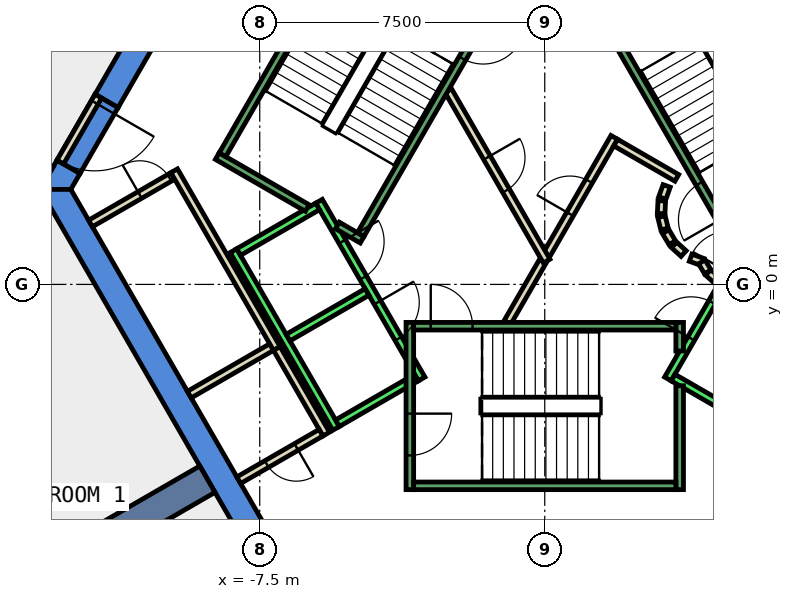
"""IFC4 building model, lengths in metres.
Left out: names, types, materials, properties, quantities, classifications, styles, units other than length and angle.
Written with IfcOpenShell. Run it as: python <this file> out.ifc"""

import sys

from ifc_helpers import new_model, si_unit, direction, frame, frame_2d, origin, place, context, subcontext, project, spatial, polyline, rectangle, outline, extrude, element, fill, save


model = new_model("IFC4")
c1 = context("Model", 3, precision=1e-05, world=origin(), true_north=direction((0.0, 1.0)))
c2 = subcontext(c1, "Body", "Model", "MODEL_VIEW")
j1 = project(units=[si_unit("LENGTHUNIT", "METRE"), si_unit("PLANEANGLEUNIT", "RADIAN")], contexts=[c1])
p1 = place(None, origin())
s1 = spatial("IfcSite", under=j1, at=p1, CompositionType="ELEMENT")
p2 = place(p1, origin())
s2 = spatial("IfcBuilding", under=s1, at=p2, CompositionType="ELEMENT")
p3 = place(p2, frame((0.0, 0.0, 219.2)))
s3 = spatial("IfcBuildingStorey", under=s2, at=p3, CompositionType="ELEMENT", Elevation=219.2)
p4 = place(p3, frame((0.0, 0.0, -0.4)))
e1 = element("IfcWall", 1, at=p4, inside=s3, PredefinedType="SHEAR", context=c2, shape_type="SweptSolid", body=[
    extrude(outline(polyline([(-11.834, 5.002), (-11.228, 4.652), (-6.235, 13.3), (-6.64, 14.0), (-11.834, 5.002)])), origin(), (0.0, 0.0, 1.0), 4.2),
])
p5 = place(p3, frame((0.0, 0.0, -0.4)))
e2 = element("IfcWall", 2, at=p5, inside=s3, PredefinedType="SHEAR", context=c2, shape_type="SweptSolid", body=[
    extrude(outline(polyline([(-12.228, 2.92), (-12.834, 3.27), (-13.279, 2.5), (-12.471, 2.5), (-12.228, 2.92)])), origin(), (0.0, 0.0, 1.0), 4.2),
])
p6 = place(p3, frame((0.0, 0.0, 3.6)))
e3 = element("IfcWall", 3, at=p6, inside=s3, PredefinedType="SHEAR", context=c2, shape_type="SweptSolid", body=[
    extrude(outline(polyline([(-12.834, 3.27), (-12.228, 2.92), (-11.228, 4.652), (-11.834, 5.002), (-12.834, 3.27)])), origin(), (0.0, 0.0, 1.0), 0.2),
])
p7 = place(p3, frame((0.0, 0.0, -0.4)))
e4 = element("IfcWall", 4, at=p7, inside=s3, PredefinedType="SHEAR", context=c2, shape_type="SweptSolid", body=[
    extrude(outline(polyline([(-13.279, 2.5), (-6.64, -9.0), (-6.235, -8.3), (-12.471, 2.5), (-13.279, 2.5)])), origin(), (0.0, 0.0, 1.0), 4.2),
])
p8 = place(p3, frame((-8.877, -5.125, -0.4), z_axis=(0.0, 0.0, 1.0), x_axis=(-0.866017533419, -0.500013631625, 0.0)))
e5 = element("IfcWall", 5, at=p8, inside=s3, PredefinedType="SHEAR", context=c2, shape_type="SweptSolid", body=[
    extrude(rectangle(XDim=9.0, YDim=0.8, at=frame_2d((4.5, 0.0))), origin(), (0.0, 0.0, 1.0), 4.2),
])
p9 = place(p3, frame((-12.984, 3.01, 0.0), z_axis=(0.0, 0.0, 1.0), x_axis=(-0.866046247233, 0.49996389635, 0.0)))
e6 = element("IfcWall", 6, at=p9, inside=s3, PredefinedType="PARTITIONING", context=c2, shape_type="SweptSolid", body=[
    extrude(rectangle(XDim=0.35, YDim=0.2, at=frame_2d((0.175, 0.0))), origin(), (0.0, 0.0, 1.0), 2.4),
])
p10 = place(p3, frame((-7.188, -1.65, 0.0), z_axis=(0.0, 0.0, 1.0), x_axis=(-0.866022959057, -0.500004234368, 0.0)))
e7 = element("IfcWall", 7, at=p10, inside=s3, PredefinedType="PARTITIONING", context=c2, shape_type="SweptSolid", body=[
    extrude(rectangle(XDim=2.5, YDim=0.2, at=frame_2d((1.25, 0.0))), origin(), (0.0, 0.0, 1.0), 3.8),
])
p11 = place(p3, frame((-11.953, 1.603, 0.0), z_axis=(0.0, 0.0, 1.0), x_axis=(0.865998541277, 0.500046524342, 0.0)))
e8 = element("IfcWall", 8, at=p11, inside=s3, PredefinedType="PARTITIONING", context=c2, shape_type="SweptSolid", body=[
    extrude(rectangle(XDim=2.5, YDim=0.2, at=frame_2d((1.25, 0.0))), origin(), (0.0, 0.0, 1.0), 3.8),
])
p12 = place(p11, frame((1.5, 0.0, 0.0)))
e9 = element("IfcOpeningElement", 9, at=p12, cuts=e8, PredefinedType="OPENING", context=c2, shape_type="SweptSolid", body=[
    extrude(rectangle(XDim=0.9, YDim=2.1, at=frame_2d((0.45, 1.05))), frame((0.0, 0.11, 0.0), z_axis=(0.0, -1.0, 0.0), x_axis=(1.0, 0.0, 0.0)), (0.0, 0.0, 1.0), 0.22),
])
p13 = place(p3, frame((-9.751, 2.99, 0.0), z_axis=(0.0, 0.0, 1.0), x_axis=(0.499955951776, -0.866050833545, 0.0)))
e10 = element("IfcWall", 10, at=p13, inside=s3, PredefinedType="PARTITIONING", context=c2, shape_type="SweptSolid", body=[
    extrude(rectangle(XDim=5.4, YDim=0.2, at=frame_2d((2.7, 0.0))), origin(), (0.0, 0.0, 1.0), 3.8),
])
p14 = place(p3, frame((-7.051, -1.687, 0.0), z_axis=(0.0, 0.0, 1.0), x_axis=(0.500128937424, -0.865950948929, 0.0)))
e11 = element("IfcWall", 11, at=p14, inside=s3, PredefinedType="PARTITIONING", context=c2, shape_type="SweptSolid", body=[
    extrude(rectangle(XDim=2.599, YDim=0.2, at=frame_2d((1.3, 0.0))), origin(), (0.0, 0.0, 1.0), 3.8),
])
p15 = place(p3, frame((-5.888, -3.902, 0.0), z_axis=(0.0, 0.0, 1.0), x_axis=(-0.866022959057, -0.500004234368, 0.0)))
e12 = element("IfcWall", 12, at=p15, inside=s3, PredefinedType="PARTITIONING", context=c2, shape_type="SweptSolid", body=[
    extrude(rectangle(XDim=2.5, YDim=0.2, at=frame_2d((1.25, 0.0))), origin(), (0.0, 0.0, 1.0), 3.8),
])
p16 = place(p15, frame((0.75, 0.0, 0.0)))
e13 = element("IfcOpeningElement", 13, at=p16, cuts=e12, PredefinedType="OPENING", context=c2, shape_type="SweptSolid", body=[
    extrude(rectangle(XDim=0.9, YDim=2.1, at=frame_2d((0.45, 1.05))), frame((0.0, 0.11, 0.0), z_axis=(0.0, -1.0, 0.0), x_axis=(1.0, 0.0, 0.0)), (0.0, 0.0, 1.0), 0.22),
])
p17 = place(p3, frame((-0.982, -1.0, 0.0), z_axis=(0.0, 0.0, 1.0), x_axis=(0.50024047865, 0.865886518847, 0.0)))
e14 = element("IfcWall", 14, at=p17, inside=s3, PredefinedType="PARTITIONING", context=c2, shape_type="SweptSolid", body=[
    extrude(rectangle(XDim=1.863, YDim=0.2, at=frame_2d((0.931, 0.0))), origin(), (0.0, 0.0, 1.0), 3.8),
])
p18 = place(p3, frame((0.05, 0.787, 0.0), z_axis=(0.0, 0.0, 1.0), x_axis=(0.499954076797, 0.866051915934, 0.0)))
e15 = element("IfcWall", 15, at=p18, inside=s3, PredefinedType="PARTITIONING", context=c2, shape_type="SweptSolid", body=[
    extrude(rectangle(XDim=3.558, YDim=0.2, at=frame_2d((1.779, 0.0))), origin(), (0.0, 0.0, 1.0), 3.8),
])
p19 = place(p18, frame((1.229, 0.0, 0.0)))
e16 = element("IfcOpeningElement", 16, at=p19, cuts=e15, PredefinedType="OPENING", context=c2, shape_type="SweptSolid", body=[
    extrude(rectangle(XDim=1.0, YDim=2.1, at=frame_2d((0.5, 1.05))), frame((0.0, 0.11, 0.0), z_axis=(0.0, -1.0, 0.0), x_axis=(1.0, 0.0, 0.0)), (0.0, 0.0, 1.0), 0.22),
])
p20 = place(p3, frame((1.866, 3.732, 0.0), z_axis=(0.0, 0.0, 1.0), x_axis=(0.866043361281, -0.499968895414, 0.0)))
e17 = element("IfcWall", 17, at=p20, inside=s3, PredefinedType="PARTITIONING", context=c2, shape_type="SweptSolid", body=[
    extrude(rectangle(XDim=1.858, YDim=0.2, at=frame_2d((0.929, 0.0))), origin(), (0.0, 0.0, 1.0), 3.8),
])
p21 = place(p3, frame((3.208, 2.592, 0.0), z_axis=(0.0, 0.0, 1.0), x_axis=(-0.337388820924, -0.941365382578, 0.0)))
e18 = element("IfcWall", 18, at=p21, inside=s3, PredefinedType="PARTITIONING", context=c2, shape_type="SweptSolid", body=[
    extrude(rectangle(XDim=0.338, YDim=0.2, at=frame_2d((0.169, 0.0))), origin(), (0.0, 0.0, 1.0), 3.8),
])
p22 = place(p3, frame((3.079, 2.199, 0.0), z_axis=(0.0, 0.0, 1.0), x_axis=(-0.047771483479, -0.998858290933, 0.0)))
e19 = element("IfcWall", 19, at=p22, inside=s3, PredefinedType="PARTITIONING", context=c2, shape_type="SweptSolid", body=[
    extrude(rectangle(XDim=0.337, YDim=0.2, at=frame_2d((0.169, 0.0))), origin(), (0.0, 0.0, 1.0), 3.8),
])
p23 = place(p3, frame((3.07, 1.786, 0.0), z_axis=(0.0, 0.0, 1.0), x_axis=(0.242705583207, -0.970099994784, 0.0)))
e20 = element("IfcWall", 20, at=p23, inside=s3, PredefinedType="PARTITIONING", context=c2, shape_type="SweptSolid", body=[
    extrude(rectangle(XDim=0.338, YDim=0.2, at=frame_2d((0.169, 0.0))), origin(), (0.0, 0.0, 1.0), 3.8),
])
for number, where, z_axis, x_axis in (
    (21, (3.182, 1.388, 0.0), (0.0, 0.0, 1.0), (0.512, -0.859, 0.0)),
    (22, (3.404, 1.039, 0.0), (0.0, 0.0, 1.0), (0.74, -0.672, 0.0)),
):
    element("IfcWall", number, at=place(p3, frame(where, z_axis=z_axis, x_axis=x_axis)), inside=s3, PredefinedType="PARTITIONING", context=c2, shape_type="SweptSolid", body=[
        extrude(rectangle(XDim=0.338, YDim=0.2, at=frame_2d((0.169, 0.0))), origin(), (0.0, 0.0, 1.0), 3.8),
    ])
p24 = place(p3, frame((3.838, 0.702, 0.0), z_axis=(0.0, 0.0, 1.0), x_axis=(0.941035081519, -0.338308993895, 0.0)))
e23 = element("IfcWall", 23, at=p24, inside=s3, PredefinedType="PARTITIONING", context=c2, shape_type="SweptSolid", body=[
    extrude(rectangle(XDim=0.337, YDim=0.2, at=frame_2d((0.168, 0.0))), origin(), (0.0, 0.0, 1.0), 3.8),
])
p25 = place(p3, frame((4.132, 0.593, 0.0), z_axis=(0.0, 0.0, 1.0), x_axis=(0.513561617048, -0.858052717201, 0.0)))
e24 = element("IfcWall", 24, at=p25, inside=s3, PredefinedType="PARTITIONING", context=c2, shape_type="SweptSolid", body=[
    extrude(rectangle(XDim=0.308, YDim=0.2, at=frame_2d((0.154, 0.0))), origin(), (0.0, 0.0, 1.0), 3.8),
])
p26 = place(p3, frame((4.301, 0.315, 0.0), z_axis=(0.0, 0.0, 1.0), x_axis=(0.741798017506, -0.670623367639, 0.0)))
e25 = element("IfcWall", 25, at=p26, inside=s3, PredefinedType="PARTITIONING", context=c2, shape_type="SweptSolid", body=[
    extrude(rectangle(XDim=0.309, YDim=0.2, at=frame_2d((0.154, 0.0))), origin(), (0.0, 0.0, 1.0), 3.8),
])
p27 = place(p3, frame((-2.54, 5.1, 0.0), z_axis=(0.0, 0.0, 1.0), x_axis=(0.499925051871, -0.866068670783, 0.0)))
e26 = element("IfcWall", 26, at=p27, inside=s3, PredefinedType="PARTITIONING", context=c2, shape_type="SweptSolid", body=[
    extrude(rectangle(XDim=5.181, YDim=0.2, at=frame_2d((2.59, 0.0))), origin(), (0.0, 0.0, 1.0), 3.8),
])
p28 = place(p27, frame((2.04, 0.0, 0.0)))
e27 = element("IfcOpeningElement", 27, at=p28, cuts=e26, PredefinedType="OPENING", context=c2, shape_type="SweptSolid", body=[
    extrude(rectangle(XDim=1.0, YDim=2.1, at=frame_2d((0.5, 1.05))), frame((0.0, 0.11, 0.0), z_axis=(0.0, -1.0, 0.0), x_axis=(1.0, 0.0, 0.0)), (0.0, 0.0, 1.0), 0.22),
])
p29 = place(p3, frame((-11.747, 4.952, 0.0), z_axis=(0.0, 0.0, 1.0), x_axis=(-0.50002537861, -0.866010750942, 0.0)))
e28 = element("IfcWall", 28, at=p29, inside=s3, PredefinedType="PARTITIONING", context=c2, shape_type="SweptSolid", body=[
    extrude(rectangle(XDim=2.0, YDim=0.2, at=frame_2d((1.0, 0.0))), origin(), (0.0, 0.0, 1.0), 2.4),
])
p30 = place(p29, frame((0.19, 0.0, 0.0)))
e29 = element("IfcOpeningElement", 29, at=p30, cuts=e28, PredefinedType="OPENING", context=c2, shape_type="SweptSolid", body=[
    extrude(rectangle(XDim=1.8, YDim=2.1, at=frame_2d((0.9, 1.05))), frame((0.0, 0.11, 0.0), z_axis=(0.0, -1.0, 0.0), x_axis=(1.0, 0.0, 0.0)), (0.0, 0.0, 1.0), 0.22),
])
p31 = place(p3, frame((-5.94, 2.188, 0.0), z_axis=(0.0, 0.0, 1.0), x_axis=(0.500034260056, -0.866005622828, 0.0)))
e30 = element("IfcWall", 30, at=p31, inside=s3, PredefinedType="STANDARD", context=c2, shape_type="SweptSolid", body=[
    extrude(rectangle(XDim=5.399, YDim=0.2, at=frame_2d((2.7, 0.0))), origin(), (0.0, 0.0, 1.0), 3.8),
])
p32 = place(p31, frame((3.075, 0.0, 0.0)))
e31 = element("IfcOpeningElement", 31, at=p32, cuts=e30, PredefinedType="OPENING", context=c2, shape_type="SweptSolid", body=[
    extrude(rectangle(XDim=1.1, YDim=2.1, at=frame_2d((0.55, 1.05))), frame((0.0, 0.11, 0.0), z_axis=(0.0, -1.0, 0.0), x_axis=(1.0, 0.0, 0.0)), (0.0, 0.0, 1.0), 0.22),
])
p33 = place(p31, frame((1.225, 0.0, 0.0)))
e32 = element("IfcOpeningElement", 32, at=p33, cuts=e30, PredefinedType="OPENING", context=c2, shape_type="SweptSolid", body=[
    extrude(rectangle(XDim=1.1, YDim=2.1, at=frame_2d((0.55, 1.05))), frame((0.0, 0.11, 0.0), z_axis=(0.0, -1.0, 0.0), x_axis=(1.0, 0.0, 0.0)), (0.0, 0.0, 1.0), 0.22),
])
p34 = place(p3, frame((-8.192, 0.888, 0.0), z_axis=(0.0, 0.0, 1.0), x_axis=(0.500034260056, -0.866005622828, 0.0)))
e33 = element("IfcWall", 33, at=p34, inside=s3, PredefinedType="STANDARD", context=c2, shape_type="SweptSolid", body=[
    extrude(rectangle(XDim=5.399, YDim=0.2, at=frame_2d((2.7, 0.0))), origin(), (0.0, 0.0, 1.0), 3.8),
])
for number, where, z_axis, x_axis in (
    (34, (-5.977, 2.052, 0.0), (0.0, 0.0, 1.0), (-0.866, -0.5, 0.0)),
    (35, (-4.677, -0.2, 0.0), (0.0, 0.0, 1.0), (-0.866, -0.5, 0.0)),
):
    element("IfcWall", number, at=place(p3, frame(where, z_axis=z_axis, x_axis=x_axis)), inside=s3, PredefinedType="STANDARD", context=c2, shape_type="SweptSolid", body=[
        extrude(rectangle(XDim=2.399, YDim=0.2, at=frame_2d((1.2, 0.0))), origin(), (0.0, 0.0, 1.0), 3.8),
    ])
p35 = place(p3, frame((-3.377, -2.452, 0.0), z_axis=(0.0, 0.0, 1.0), x_axis=(-0.865955154139, -0.50012165622, 0.0)))
e36 = element("IfcWall", 36, at=p35, inside=s3, PredefinedType="STANDARD", context=c2, shape_type="SweptSolid", body=[
    extrude(rectangle(XDim=2.4, YDim=0.2, at=frame_2d((1.2, 0.0))), origin(), (0.0, 0.0, 1.0), 3.8),
])
p36 = place(p3, frame((3.24, -2.488, 0.0), z_axis=(0.0, 0.0, 1.0), x_axis=(0.500034260056, 0.866005622828, 0.0)))
e37 = element("IfcWall", 37, at=p36, inside=s3, PredefinedType="STANDARD", context=c2, shape_type="SweptSolid", body=[
    extrude(rectangle(XDim=5.399, YDim=0.2, at=frame_2d((2.7, 0.0))), origin(), (0.0, 0.0, 1.0), 3.8),
])
p37 = place(p36, frame((3.225, 0.0, 0.0)))
e38 = element("IfcOpeningElement", 38, at=p37, cuts=e37, PredefinedType="OPENING", context=c2, shape_type="SweptSolid", body=[
    extrude(rectangle(XDim=1.1, YDim=2.1, at=frame_2d((0.55, 1.05))), frame((0.0, 0.11, 0.0), z_axis=(0.0, -1.0, 0.0), x_axis=(1.0, 0.0, 0.0)), (0.0, 0.0, 1.0), 0.22),
])
p38 = place(p36, frame((1.225, 0.0, 0.0)))
e39 = element("IfcOpeningElement", 39, at=p38, cuts=e37, PredefinedType="OPENING", context=c2, shape_type="SweptSolid", body=[
    extrude(rectangle(XDim=1.1, YDim=2.1, at=frame_2d((0.55, 1.05))), frame((0.0, 0.11, 0.0), z_axis=(0.0, -1.0, 0.0), x_axis=(1.0, 0.0, 0.0)), (0.0, 0.0, 1.0), 0.22),
])
p39 = place(p3, frame((3.377, -2.452, 0.0), z_axis=(0.0, 0.0, 1.0), x_axis=(0.865955154139, -0.50012165622, 0.0)))
e40 = element("IfcWall", 40, at=p39, inside=s3, PredefinedType="STANDARD", context=c2, shape_type="SweptSolid", body=[
    extrude(rectangle(XDim=2.4, YDim=0.2, at=frame_2d((1.2, 0.0))), origin(), (0.0, 0.0, 1.0), 3.8),
])
p40 = place(p3, frame((-3.55, -1.0, 0.0), z_axis=(0.0, 0.0, 1.0), x_axis=(0.0, -1.0, 0.0)))
e41 = element("IfcWall", 41, at=p40, inside=s3, PredefinedType="STANDARD", context=c2, shape_type="SweptSolid", body=[
    extrude(rectangle(XDim=4.4, YDim=0.2, at=frame_2d((2.2, 0.0))), origin(), (0.0, 0.0, 1.0), 3.8),
])
p41 = place(p40, frame((2.4, 0.0, 0.0)))
e42 = element("IfcOpeningElement", 42, at=p41, cuts=e41, PredefinedType="OPENING", context=c2, shape_type="SweptSolid", body=[
    extrude(rectangle(XDim=1.1, YDim=2.2, at=frame_2d((0.55, 1.1))), frame((0.0, 0.11, 0.0), z_axis=(0.0, -1.0, 0.0), x_axis=(1.0, 0.0, 0.0)), (0.0, 0.0, 1.0), 0.22),
])
p42 = place(p3, frame((3.55, -2.667, 0.0), z_axis=(0.0, 0.0, 1.0), x_axis=(0.0, -1.0, 0.0)))
e43 = element("IfcWall", 43, at=p42, inside=s3, PredefinedType="STANDARD", context=c2, shape_type="SweptSolid", body=[
    extrude(rectangle(XDim=2.733, YDim=0.2, at=frame_2d((1.366, 0.0))), origin(), (0.0, 0.0, 1.0), 3.8),
])
p43 = place(p3, frame((3.55, -1.0, 0.0), z_axis=(0.0, 0.0, 1.0), x_axis=(0.0, -1.0, 0.0)))
e44 = element("IfcWall", 44, at=p43, inside=s3, PredefinedType="STANDARD", context=c2, shape_type="SweptSolid", body=[
    extrude(rectangle(XDim=0.751, YDim=0.2, at=frame_2d((0.375, 0.0))), origin(), (0.0, 0.0, 1.0), 3.8),
])
p44 = place(p3, frame((-3.45, -1.1, 0.0), z_axis=(0.0, 0.0, 1.0), x_axis=(1.0, 0.0, 0.0)))
e45 = element("IfcWall", 45, at=p44, inside=s3, PredefinedType="STANDARD", context=c2, shape_type="SweptSolid", body=[
    extrude(rectangle(XDim=6.9, YDim=0.2, at=frame_2d((3.45, 0.0))), origin(), (0.0, 0.0, 1.0), 3.8),
])
p45 = place(p44, frame((0.45, 0.0, 0.0)))
e46 = element("IfcOpeningElement", 46, at=p45, cuts=e45, PredefinedType="OPENING", context=c2, shape_type="SweptSolid", body=[
    extrude(rectangle(XDim=1.1, YDim=2.2, at=frame_2d((0.55, 1.1))), frame((0.0, 0.11, 0.0), z_axis=(0.0, -1.0, 0.0), x_axis=(1.0, 0.0, 0.0)), (0.0, 0.0, 1.0), 0.22),
])
p46 = place(p3, frame((-3.45, -5.3, 0.0), z_axis=(0.0, 0.0, 1.0), x_axis=(1.0, 0.0, 0.0)))
e47 = element("IfcWall", 47, at=p46, inside=s3, PredefinedType="STANDARD", context=c2, shape_type="SweptSolid", body=[
    extrude(rectangle(XDim=6.9, YDim=0.2, at=frame_2d((3.45, 0.0))), origin(), (0.0, 0.0, 1.0), 3.8),
])
p47 = place(p3, frame((4.843, 1.312, 0.0), z_axis=(0.0, 0.0, 1.0), x_axis=(-0.499963383562, 0.866046543262, 0.0)))
e48 = element("IfcWall", 48, at=p47, inside=s3, PredefinedType="STANDARD", context=c2, shape_type="SweptSolid", body=[
    extrude(rectangle(XDim=6.9, YDim=0.2, at=frame_2d((3.45, 0.0))), origin(), (0.0, 0.0, 1.0), 3.8),
])
p48 = place(p47, frame((0.45, 0.0, 0.0)))
e49 = element("IfcOpeningElement", 49, at=p48, cuts=e48, PredefinedType="OPENING", context=c2, shape_type="SweptSolid", body=[
    extrude(rectangle(XDim=1.1, YDim=2.2, at=frame_2d((0.55, 1.1))), frame((0.0, 0.11, 0.0), z_axis=(0.0, -1.0, 0.0), x_axis=(1.0, 0.0, 0.0)), (0.0, 0.0, 1.0), 0.22),
])
p49 = place(p3, frame((-6.25, 2.01, 0.0), z_axis=(0.0, 0.0, 1.0), x_axis=(-0.86611865017, 0.499838457731, 0.0)))
e50 = element("IfcWall", 50, at=p49, inside=s3, PredefinedType="STANDARD", context=c2, shape_type="SweptSolid", body=[
    extrude(rectangle(XDim=2.733, YDim=0.2, at=frame_2d((1.366, 0.0))), origin(), (0.0, 0.0, 1.0), 3.8),
])
p50 = place(p3, frame((-4.806, 1.176, 0.0), z_axis=(0.0, 0.0, 1.0), x_axis=(-0.866558586415, 0.499075361355, 0.0)))
e51 = element("IfcWall", 51, at=p50, inside=s3, PredefinedType="STANDARD", context=c2, shape_type="SweptSolid", body=[
    extrude(rectangle(XDim=0.751, YDim=0.2, at=frame_2d((0.376, 0.0))), origin(), (0.0, 0.0, 1.0), 3.8),
])
p51 = place(p3, frame((-1.393, 7.288, 0.0), z_axis=(0.0, 0.0, 1.0), x_axis=(-0.499963383562, -0.866046543262, 0.0)))
e52 = element("IfcWall", 52, at=p51, inside=s3, PredefinedType="STANDARD", context=c2, shape_type="SweptSolid", body=[
    extrude(rectangle(XDim=6.9, YDim=0.2, at=frame_2d((3.45, 0.0))), origin(), (0.0, 0.0, 1.0), 3.8),
])
p52 = place(p51, frame((0.45, 0.0, 0.0)))
e53 = element("IfcOpeningElement", 53, at=p52, cuts=e52, PredefinedType="OPENING", context=c2, shape_type="SweptSolid", body=[
    extrude(rectangle(XDim=1.1, YDim=2.2, at=frame_2d((0.55, 1.1))), frame((0.0, 0.11, 0.0), z_axis=(0.0, -1.0, 0.0), x_axis=(1.0, 0.0, 0.0)), (0.0, 0.0, 1.0), 0.22),
])
p53 = place(p3, frame((-5.03, 9.388, 0.0), z_axis=(0.0, 0.0, 1.0), x_axis=(-0.499978703459, -0.866037698999, 0.0)))
e54 = element("IfcWall", 54, at=p53, inside=s3, PredefinedType="STANDARD", context=c2, shape_type="SweptSolid", body=[
    extrude(rectangle(XDim=6.9, YDim=0.2, at=frame_2d((3.45, 0.0))), origin(), (0.0, 0.0, 1.0), 3.8),
])
p54 = place(p19, origin())
e55 = element("IfcDoor", 55, at=p54, inside=s3, OperationType="SINGLE_SWING_RIGHT", PredefinedType="DOOR", context=c2, shape_type="SweptSolid", body=[
    extrude(rectangle(XDim=1.0, YDim=2.1, at=frame_2d((0.5, 1.05))), frame((0.0, 0.025, 0.0), z_axis=(0.0, -1.0, 0.0), x_axis=(1.0, 0.0, 0.0)), (0.0, 0.0, 1.0), 0.05),
])
fill(e16, e55)
p55 = place(p28, origin())
e56 = element("IfcDoor", 56, at=p55, inside=s3, OperationType="SINGLE_SWING_RIGHT", PredefinedType="DOOR", context=c2, shape_type="SweptSolid", body=[
    extrude(rectangle(XDim=1.0, YDim=2.1, at=frame_2d((0.5, 1.05))), frame((0.0, 0.025, 0.0), z_axis=(0.0, -1.0, 0.0), x_axis=(1.0, 0.0, 0.0)), (0.0, 0.0, 1.0), 0.05),
])
fill(e27, e56)
p56 = place(p12, origin())
e57 = element("IfcDoor", 57, at=p56, inside=s3, OperationType="SINGLE_SWING_LEFT", PredefinedType="DOOR", context=c2, shape_type="SweptSolid", body=[
    extrude(rectangle(XDim=0.9, YDim=2.1, at=frame_2d((0.45, 1.05))), frame((0.0, 0.025, 0.0), z_axis=(0.0, -1.0, 0.0), x_axis=(1.0, 0.0, 0.0)), (0.0, 0.0, 1.0), 0.05),
])
fill(e9, e57)
p57 = place(p16, origin())
e58 = element("IfcDoor", 58, at=p57, inside=s3, OperationType="SINGLE_SWING_RIGHT", PredefinedType="DOOR", context=c2, shape_type="SweptSolid", body=[
    extrude(rectangle(XDim=0.9, YDim=2.1, at=frame_2d((0.45, 1.05))), frame((0.0, 0.025, 0.0), z_axis=(0.0, -1.0, 0.0), x_axis=(1.0, 0.0, 0.0)), (0.0, 0.0, 1.0), 0.05),
])
fill(e13, e58)
p58 = place(p30, origin())
e59 = element("IfcDoor", 59, at=p58, inside=s3, OperationType="DOUBLE_DOOR_SINGLE_SWING", PredefinedType="DOOR", context=c2, shape_type="SweptSolid", body=[
    extrude(rectangle(XDim=1.8, YDim=2.1, at=frame_2d((0.9, 1.05))), frame((0.0, 0.025, 0.0), z_axis=(0.0, -1.0, 0.0), x_axis=(1.0, 0.0, 0.0)), (0.0, 0.0, 1.0), 0.05),
])
fill(e29, e59)
p59 = place(p32, origin())
e60 = element("IfcDoor", 60, at=p59, inside=s3, OperationType="SLIDING_TO_LEFT", PredefinedType="DOOR", context=c2, shape_type="SweptSolid", body=[
    extrude(rectangle(XDim=1.1, YDim=2.1, at=frame_2d((0.55, 1.05))), frame((0.0, 0.025, 0.0), z_axis=(0.0, -1.0, 0.0), x_axis=(1.0, 0.0, 0.0)), (0.0, 0.0, 1.0), 0.05),
])
fill(e31, e60)
p60 = place(p38, origin())
e61 = element("IfcDoor", 61, at=p60, inside=s3, OperationType="SLIDING_TO_LEFT", PredefinedType="DOOR", context=c2, shape_type="SweptSolid", body=[
    extrude(rectangle(XDim=1.1, YDim=2.1, at=frame_2d((0.55, 1.05))), frame((0.0, 0.025, 0.0), z_axis=(0.0, -1.0, 0.0), x_axis=(1.0, 0.0, 0.0)), (0.0, 0.0, 1.0), 0.05),
])
fill(e39, e61)
p61 = place(p33, origin())
e62 = element("IfcDoor", 62, at=p61, inside=s3, OperationType="SLIDING_TO_LEFT", PredefinedType="DOOR", context=c2, shape_type="SweptSolid", body=[
    extrude(rectangle(XDim=1.1, YDim=2.1, at=frame_2d((0.55, 1.05))), frame((0.0, 0.025, 0.0), z_axis=(0.0, -1.0, 0.0), x_axis=(1.0, 0.0, 0.0)), (0.0, 0.0, 1.0), 0.05),
])
fill(e32, e62)
p62 = place(p45, origin())
e63 = element("IfcDoor", 63, at=p62, inside=s3, OperationType="SINGLE_SWING_LEFT", PredefinedType="DOOR", context=c2, shape_type="SweptSolid", body=[
    extrude(rectangle(XDim=1.1, YDim=2.2, at=frame_2d((0.55, 1.1))), frame((0.0, 0.025, 0.0), z_axis=(0.0, -1.0, 0.0), x_axis=(1.0, 0.0, 0.0)), (0.0, 0.0, 1.0), 0.05),
])
fill(e46, e63)
p63 = place(p41, origin())
e64 = element("IfcDoor", 64, at=p63, inside=s3, OperationType="SINGLE_SWING_LEFT", PredefinedType="DOOR", context=c2, shape_type="SweptSolid", body=[
    extrude(rectangle(XDim=1.1, YDim=2.2, at=frame_2d((0.55, 1.1))), frame((0.0, 0.025, 0.0), z_axis=(0.0, -1.0, 0.0), x_axis=(1.0, 0.0, 0.0)), (0.0, 0.0, 1.0), 0.05),
])
fill(e42, e64)
p64 = place(p48, origin())
e65 = element("IfcDoor", 65, at=p64, inside=s3, OperationType="SINGLE_SWING_LEFT", PredefinedType="DOOR", context=c2, shape_type="SweptSolid", body=[
    extrude(rectangle(XDim=1.1, YDim=2.2, at=frame_2d((0.55, 1.1))), frame((0.0, 0.025, 0.0), z_axis=(0.0, -1.0, 0.0), x_axis=(1.0, 0.0, 0.0)), (0.0, 0.0, 1.0), 0.05),
])
fill(e49, e65)
p65 = place(p52, origin())
e66 = element("IfcDoor", 66, at=p65, inside=s3, OperationType="SINGLE_SWING_LEFT", PredefinedType="DOOR", context=c2, shape_type="SweptSolid", body=[
    extrude(rectangle(XDim=1.1, YDim=2.2, at=frame_2d((0.55, 1.1))), frame((0.0, 0.025, 0.0), z_axis=(0.0, -1.0, 0.0), x_axis=(1.0, 0.0, 0.0)), (0.0, 0.0, 1.0), 0.05),
])
fill(e53, e66)
save(model, sys.argv[1])
